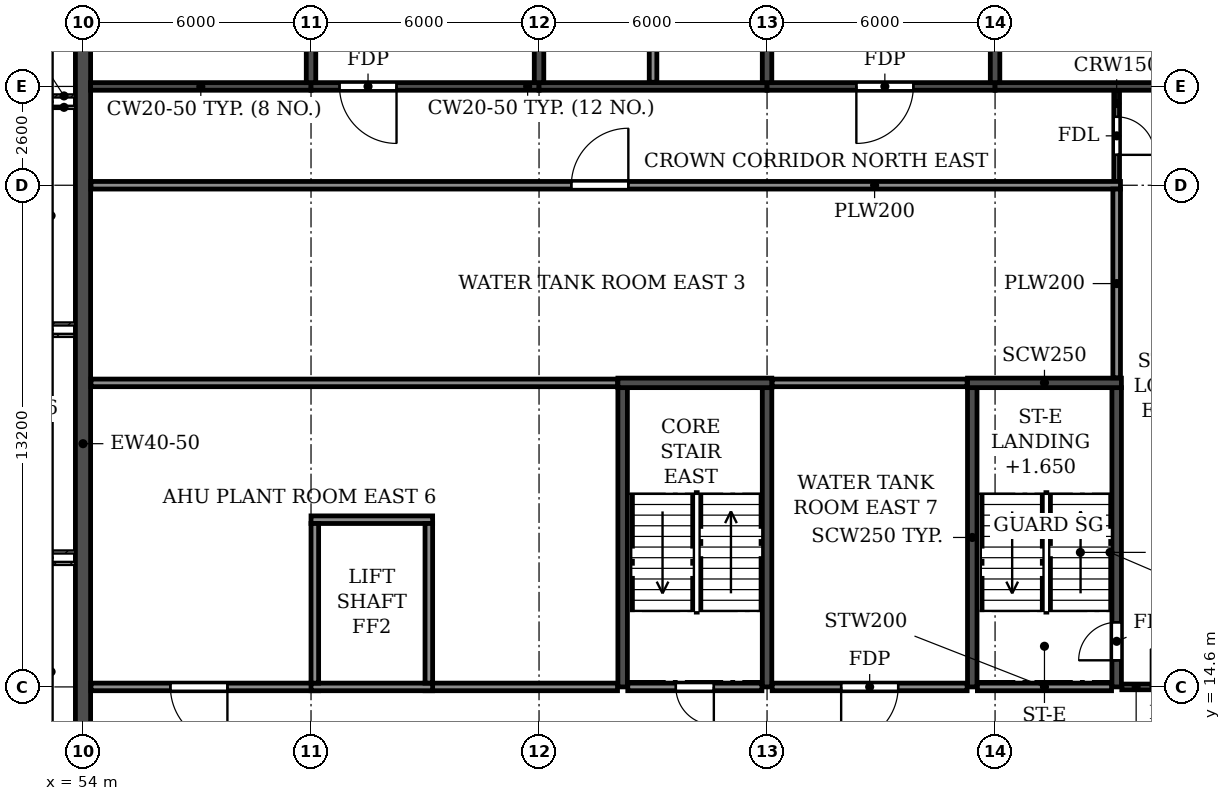
"""IFC4 building model, lengths in metres.
Left out: names, types, materials, properties, quantities, classifications, styles, units other than length and angle.
Written with IfcOpenShell. Run it as: python <this file> out.ifc"""

import sys

from ifc_helpers import new_model, si_unit, direction, frame, frame_2d, origin, place, context, subcontext, project, spatial, rectangle, extrude, element, fill, save


model = new_model("IFC4")
c1 = context("Model", 3, precision=1e-05, world=origin(), true_north=direction((0.0, 1.0)))
c2 = subcontext(c1, "Body", "Model", "MODEL_VIEW")
j1 = project(units=[si_unit("LENGTHUNIT", "METRE"), si_unit("PLANEANGLEUNIT", "RADIAN")], contexts=[c1])
p1 = place(None, origin())
s1 = spatial("IfcSite", under=j1, at=p1, CompositionType="ELEMENT")
p2 = place(p1, origin())
s2 = spatial("IfcBuilding", under=s1, at=p2, CompositionType="ELEMENT")
p3 = place(p2, frame((0.0, 0.0, 272.4)))
s3 = spatial("IfcBuildingStorey", under=s2, at=p3, CompositionType="ELEMENT", Elevation=272.4)
for number, where, z_axis, x_axis in (
    (1, (60.0, 30.5, 0.0), (0.0, 0.0, 1.0), (0.0, 1.0, 0.0)),
    (2, (66.0, 30.5, 0.0), (0.0, 0.0, 1.0), (0.0, 1.0, 0.0)),
    (3, (72.0, 30.5, 0.0), (0.0, 0.0, 1.0), (0.0, 1.0, 0.0)),
    (4, (78.0, 30.5, 0.0), (0.0, 0.0, 1.0), (0.0, 1.0, 0.0)),
):
    element("IfcWall", number, at=place(p3, frame(where, z_axis=z_axis, x_axis=x_axis)), inside=s3, PredefinedType="SHEAR", context=c2, shape_type="SweptSolid", body=[
        extrude(rectangle(XDim=10.5, YDim=0.25, at=frame_2d((5.25, 0.0))), origin(), (0.0, 0.0, 1.0), 3.05),
    ])
p4 = place(p3, frame((54.0, 0.2, 0.0), z_axis=(0.0, 0.0, 1.0), x_axis=(0.0, 1.0, 0.0)))
e5 = element("IfcWall", 5, at=p4, inside=s3, PredefinedType="SHEAR", context=c2, shape_type="SweptSolid", body=[
    extrude(rectangle(XDim=40.8, YDim=0.4, at=frame_2d((20.4, 0.0))), origin(), (0.0, 0.0, 1.0), 3.05),
])
p5 = place(p3, frame((54.2, 30.4, 0.0), z_axis=(0.0, 0.0, 1.0), x_axis=(1.0, 0.0, 0.0)))
e6 = element("IfcWall", 6, at=p5, inside=s3, PredefinedType="SHEAR", context=c2, shape_type="SweptSolid", body=[
    extrude(rectangle(XDim=5.8, YDim=0.2, at=frame_2d((2.9, 0.0))), origin(), (0.0, 0.0, 1.0), 2.45),
])
p6 = place(p3, frame((60.0, 30.4, 0.0), z_axis=(0.0, 0.0, 1.0), x_axis=(1.0, 0.0, 0.0)))
e7 = element("IfcWall", 7, at=p6, inside=s3, PredefinedType="SHEAR", context=c2, shape_type="SweptSolid", body=[
    extrude(rectangle(XDim=6.0, YDim=0.2, at=frame_2d((3.0, 0.0))), origin(), (0.0, 0.0, 1.0), 2.45),
])
p7 = place(p6, frame((0.75, 0.0, 0.0)))
e8 = element("IfcOpeningElement", 8, at=p7, cuts=e7, PredefinedType="OPENING", context=c2, shape_type="SweptSolid", body=[
    extrude(rectangle(XDim=1.5, YDim=2.1, at=frame_2d((0.75, 1.05))), frame((0.0, 0.11, 0.0), z_axis=(0.0, -1.0, 0.0), x_axis=(1.0, 0.0, 0.0)), (0.0, 0.0, 1.0), 0.22),
])
p8 = place(p3, frame((66.0, 30.4, 0.0), z_axis=(0.0, 0.0, 1.0), x_axis=(1.0, 0.0, 0.0)))
e9 = element("IfcWall", 9, at=p8, inside=s3, PredefinedType="SHEAR", context=c2, shape_type="SweptSolid", body=[
    extrude(rectangle(XDim=6.0, YDim=0.2, at=frame_2d((3.0, 0.0))), origin(), (0.0, 0.0, 1.0), 2.45),
])
p9 = place(p3, frame((72.0, 30.4, 0.0), z_axis=(0.0, 0.0, 1.0), x_axis=(1.0, 0.0, 0.0)))
e10 = element("IfcWall", 10, at=p9, inside=s3, PredefinedType="SHEAR", context=c2, shape_type="SweptSolid", body=[
    extrude(rectangle(XDim=6.0, YDim=0.2, at=frame_2d((3.0, 0.0))), origin(), (0.0, 0.0, 1.0), 2.45),
])
p10 = place(p9, frame((2.35, 0.0, 0.0)))
e11 = element("IfcOpeningElement", 11, at=p10, cuts=e10, PredefinedType="OPENING", context=c2, shape_type="SweptSolid", body=[
    extrude(rectangle(XDim=1.5, YDim=2.1, at=frame_2d((0.75, 1.05))), frame((0.0, 0.11, 0.0), z_axis=(0.0, -1.0, 0.0), x_axis=(1.0, 0.0, 0.0)), (0.0, 0.0, 1.0), 0.22),
])
p11 = place(p3, frame((78.0, 30.4, 0.0), z_axis=(0.0, 0.0, 1.0), x_axis=(1.0, 0.0, 0.0)))
e12 = element("IfcWall", 12, at=p11, inside=s3, PredefinedType="SHEAR", context=c2, shape_type="SweptSolid", body=[
    extrude(rectangle(XDim=5.8, YDim=0.2, at=frame_2d((2.9, 0.0))), origin(), (0.0, 0.0, 1.0), 2.45),
])
p12 = place(p3, frame((77.4, 14.6, 0.0), z_axis=(0.0, 0.0, 1.0), x_axis=(0.0, 1.0, 0.0)))
e13 = element("IfcWall", 13, at=p12, inside=s3, PredefinedType="SOLIDWALL", context=c2, shape_type="SweptSolid", body=[
    extrude(rectangle(XDim=7.875, YDim=0.25, at=frame_2d((3.938, 0.0))), origin(), (0.0, 0.0, 1.0), 3.05),
])
p13 = place(p3, frame((81.2, 14.6, 0.0), z_axis=(0.0, 0.0, 1.0), x_axis=(0.0, 1.0, 0.0)))
e14 = element("IfcWall", 14, at=p13, inside=s3, PredefinedType="SOLIDWALL", context=c2, shape_type="SweptSolid", body=[
    extrude(rectangle(XDim=7.875, YDim=0.25, at=frame_2d((3.938, 0.0))), origin(), (0.0, 0.0, 1.0), 3.05),
])
p14 = place(p13, frame((0.7, 0.0, 0.0)))
e15 = element("IfcOpeningElement", 15, at=p14, cuts=e14, PredefinedType="OPENING", context=c2, shape_type="SweptSolid", body=[
    extrude(rectangle(XDim=1.0, YDim=2.1, at=frame_2d((0.5, 1.05))), frame((0.0, 0.135, 0.0), z_axis=(0.0, -1.0, 0.0), x_axis=(1.0, 0.0, 0.0)), (0.0, 0.0, 1.0), 0.27),
])
p15 = place(p3, frame((77.275, 22.6, 0.0), z_axis=(0.0, 0.0, 1.0), x_axis=(1.0, 0.0, 0.0)))
e16 = element("IfcWall", 16, at=p15, inside=s3, PredefinedType="SOLIDWALL", context=c2, shape_type="SweptSolid", body=[
    extrude(rectangle(XDim=4.05, YDim=0.25, at=frame_2d((2.025, 0.0))), origin(), (0.0, 0.0, 1.0), 3.05),
])
for number, where, z_axis, x_axis in (
    (17, (68.2, 14.6, 0.0), (0.0, 0.0, 1.0), (0.0, 1.0, 0.0)),
    (18, (72.0, 14.6, 0.0), (0.0, 0.0, 1.0), (0.0, 1.0, 0.0)),
):
    element("IfcWall", number, at=place(p3, frame(where, z_axis=z_axis, x_axis=x_axis)), inside=s3, PredefinedType="SOLIDWALL", context=c2, shape_type="SweptSolid", body=[
        extrude(rectangle(XDim=7.875, YDim=0.25, at=frame_2d((3.938, 0.0))), origin(), (0.0, 0.0, 1.0), 3.05),
    ])
p16 = place(p3, frame((68.075, 22.6, 0.0), z_axis=(0.0, 0.0, 1.0), x_axis=(1.0, 0.0, 0.0)))
e19 = element("IfcWall", 19, at=p16, inside=s3, PredefinedType="SOLIDWALL", context=c2, shape_type="SweptSolid", body=[
    extrude(rectangle(XDim=4.05, YDim=0.25, at=frame_2d((2.025, 0.0))), origin(), (0.0, 0.0, 1.0), 3.05),
])
p17 = place(p3, frame((81.335, 14.6, 0.0), z_axis=(0.0, 0.0, 1.0), x_axis=(1.0, 0.0, 0.0)))
e20 = element("IfcWall", 20, at=p17, inside=s3, PredefinedType="PARTITIONING", context=c2, shape_type="SweptSolid", body=[
    extrude(rectangle(XDim=2.455, YDim=0.15, at=frame_2d((1.228, 0.0))), origin(), (0.0, 0.0, 1.0), 3.05),
])
p18 = place(p17, frame((0.765, 0.0, 0.0)))
e21 = element("IfcOpeningElement", 21, at=p18, cuts=e20, PredefinedType="OPENING", context=c2, shape_type="SweptSolid", body=[
    extrude(rectangle(XDim=1.0, YDim=2.1, at=frame_2d((0.5, 1.05))), frame((0.0, 0.085, 0.0), z_axis=(0.0, -1.0, 0.0), x_axis=(1.0, 0.0, 0.0)), (0.0, 0.0, 1.0), 0.17),
])
p19 = place(p3, frame((81.2, 27.9, 0.0), z_axis=(0.0, 0.0, 1.0), x_axis=(0.0, 1.0, 0.0)))
e22 = element("IfcWall", 22, at=p19, inside=s3, PredefinedType="PARTITIONING", context=c2, shape_type="SweptSolid", body=[
    extrude(rectangle(XDim=2.39, YDim=0.15, at=frame_2d((1.195, 0.0))), origin(), (0.0, 0.0, 1.0), 3.05),
])
p20 = place(p19, frame((0.7, 0.0, 0.0)))
e23 = element("IfcOpeningElement", 23, at=p20, cuts=e22, PredefinedType="OPENING", context=c2, shape_type="SweptSolid", body=[
    extrude(rectangle(XDim=1.0, YDim=2.1, at=frame_2d((0.5, 1.05))), frame((0.0, 0.085, 0.0), z_axis=(0.0, -1.0, 0.0), x_axis=(1.0, 0.0, 0.0)), (0.0, 0.0, 1.0), 0.17),
])
p21 = place(p3, frame((54.21, 14.6, 0.0), z_axis=(0.0, 0.0, 1.0), x_axis=(1.0, 0.0, 0.0)))
e24 = element("IfcWall", 24, at=p21, inside=s3, PredefinedType="PARTITIONING", context=c2, shape_type="SweptSolid", body=[
    extrude(rectangle(XDim=5.99, YDim=0.2, at=frame_2d((2.995, 0.0))), origin(), (0.0, 0.0, 1.0), 3.05),
])
p22 = place(p21, frame((2.09, 0.0, 0.0)))
e25 = element("IfcOpeningElement", 25, at=p22, cuts=e24, PredefinedType="OPENING", context=c2, shape_type="SweptSolid", body=[
    extrude(rectangle(XDim=1.5, YDim=2.1, at=frame_2d((0.75, 1.05))), frame((0.0, 0.11, 0.0), z_axis=(0.0, -1.0, 0.0), x_axis=(1.0, 0.0, 0.0)), (0.0, 0.0, 1.0), 0.22),
])
p23 = place(p3, frame((63.0, 14.6, 0.0), z_axis=(0.0, 0.0, 1.0), x_axis=(1.0, 0.0, 0.0)))
e26 = element("IfcWall", 26, at=p23, inside=s3, PredefinedType="PARTITIONING", context=c2, shape_type="SweptSolid", body=[
    extrude(rectangle(XDim=5.065, YDim=0.2, at=frame_2d((2.532, 0.0))), origin(), (0.0, 0.0, 1.0), 3.05),
])
p24 = place(p3, frame((72.135, 14.6, 0.0), z_axis=(0.0, 0.0, 1.0), x_axis=(1.0, 0.0, 0.0)))
e27 = element("IfcWall", 27, at=p24, inside=s3, PredefinedType="PARTITIONING", context=c2, shape_type="SweptSolid", body=[
    extrude(rectangle(XDim=5.13, YDim=0.2, at=frame_2d((2.565, 0.0))), origin(), (0.0, 0.0, 1.0), 3.05),
])
p25 = place(p24, frame((1.815, 0.0, 0.0)))
e28 = element("IfcOpeningElement", 28, at=p25, cuts=e27, PredefinedType="OPENING", context=c2, shape_type="SweptSolid", body=[
    extrude(rectangle(XDim=1.5, YDim=2.1, at=frame_2d((0.75, 1.05))), frame((0.0, 0.11, 0.0), z_axis=(0.0, -1.0, 0.0), x_axis=(1.0, 0.0, 0.0)), (0.0, 0.0, 1.0), 0.22),
])
p26 = place(p3, frame((54.21, 22.6, 0.0), z_axis=(0.0, 0.0, 1.0), x_axis=(1.0, 0.0, 0.0)))
e29 = element("IfcWall", 29, at=p26, inside=s3, PredefinedType="PARTITIONING", context=c2, shape_type="SweptSolid", body=[
    extrude(rectangle(XDim=13.855, YDim=0.2, at=frame_2d((6.927, 0.0))), origin(), (0.0, 0.0, 1.0), 3.05),
])
p27 = place(p3, frame((72.135, 22.6, 0.0), z_axis=(0.0, 0.0, 1.0), x_axis=(1.0, 0.0, 0.0)))
e30 = element("IfcWall", 30, at=p27, inside=s3, PredefinedType="PARTITIONING", context=c2, shape_type="SweptSolid", body=[
    extrude(rectangle(XDim=5.13, YDim=0.2, at=frame_2d((2.565, 0.0))), origin(), (0.0, 0.0, 1.0), 3.05),
])
p28 = place(p3, frame((54.21, 27.8, 0.0), z_axis=(0.0, 0.0, 1.0), x_axis=(1.0, 0.0, 0.0)))
e31 = element("IfcWall", 31, at=p28, inside=s3, PredefinedType="PARTITIONING", context=c2, shape_type="SweptSolid", body=[
    extrude(rectangle(XDim=27.09, YDim=0.2, at=frame_2d((13.545, 0.0))), origin(), (0.0, 0.0, 1.0), 3.05),
])
p29 = place(p28, frame((12.64, 0.0, 0.0)))
e32 = element("IfcOpeningElement", 32, at=p29, cuts=e31, PredefinedType="OPENING", context=c2, shape_type="SweptSolid", body=[
    extrude(rectangle(XDim=1.5, YDim=2.1, at=frame_2d((0.75, 1.05))), frame((0.0, 0.11, 0.0), z_axis=(0.0, -1.0, 0.0), x_axis=(1.0, 0.0, 0.0)), (0.0, 0.0, 1.0), 0.22),
])
p30 = place(p3, frame((69.0, 30.51, 0.0), z_axis=(0.0, 0.0, 1.0), x_axis=(0.0, 1.0, 0.0)))
e33 = element("IfcWall", 33, at=p30, inside=s3, PredefinedType="PARTITIONING", context=c2, shape_type="SweptSolid", body=[
    extrude(rectangle(XDim=10.63, YDim=0.2, at=frame_2d((5.315, 0.0))), origin(), (0.0, 0.0, 1.0), 3.05),
])
p31 = place(p3, frame((81.2, 22.735, 0.0), z_axis=(0.0, 0.0, 1.0), x_axis=(0.0, 1.0, 0.0)))
e34 = element("IfcWall", 34, at=p31, inside=s3, PredefinedType="PARTITIONING", context=c2, shape_type="SweptSolid", body=[
    extrude(rectangle(XDim=4.965, YDim=0.2, at=frame_2d((2.482, 0.0))), origin(), (0.0, 0.0, 1.0), 3.05),
])
for number, where, z_axis, x_axis in (
    (35, (60.0, 14.6, 0.0), (0.0, 0.0, 1.0), (1.0, 0.0, 0.0)),
    (36, (60.0, 19.0, 0.0), (0.0, 0.0, 1.0), (1.0, 0.0, 0.0)),
):
    element("IfcWall", number, at=place(p3, frame(where, z_axis=z_axis, x_axis=x_axis)), inside=s3, PredefinedType="PARTITIONING", context=c2, shape_type="SweptSolid", body=[
        extrude(rectangle(XDim=3.2, YDim=0.2, at=frame_2d((1.6, 0.0))), origin(), (0.0, 0.0, 1.0), 3.05),
    ])
for number, where, z_axis, x_axis in (
    (37, (60.1, 14.7, 0.0), (0.0, 0.0, 1.0), (0.0, 1.0, 0.0)),
    (38, (63.1, 14.7, 0.0), (0.0, 0.0, 1.0), (0.0, 1.0, 0.0)),
):
    element("IfcWall", number, at=place(p3, frame(where, z_axis=z_axis, x_axis=x_axis)), inside=s3, PredefinedType="PARTITIONING", context=c2, shape_type="SweptSolid", body=[
        extrude(rectangle(XDim=4.2, YDim=0.2, at=frame_2d((2.1, 0.0))), origin(), (0.0, 0.0, 1.0), 3.05),
    ])
p32 = place(p3, frame((68.335, 14.6, 0.0), z_axis=(0.0, 0.0, 1.0), x_axis=(1.0, 0.0, 0.0)))
e39 = element("IfcWall", 39, at=p32, inside=s3, PredefinedType="PARTITIONING", context=c2, shape_type="SweptSolid", body=[
    extrude(rectangle(XDim=3.53, YDim=0.2, at=frame_2d((1.765, 0.0))), origin(), (0.0, 0.0, 1.0), 3.05),
])
p33 = place(p32, frame((1.265, 0.0, 0.0)))
e40 = element("IfcOpeningElement", 40, at=p33, cuts=e39, PredefinedType="OPENING", context=c2, shape_type="SweptSolid", body=[
    extrude(rectangle(XDim=1.0, YDim=2.1, at=frame_2d((0.5, 1.05))), frame((0.0, 0.11, 0.0), z_axis=(0.0, -1.0, 0.0), x_axis=(1.0, 0.0, 0.0)), (0.0, 0.0, 1.0), 0.22),
])
p34 = place(p3, frame((77.535, 14.6, 0.0), z_axis=(0.0, 0.0, 1.0), x_axis=(1.0, 0.0, 0.0)))
e41 = element("IfcWall", 41, at=p34, inside=s3, PredefinedType="PARTITIONING", context=c2, shape_type="SweptSolid", body=[
    extrude(rectangle(XDim=3.53, YDim=0.2, at=frame_2d((1.765, 0.0))), origin(), (0.0, 0.0, 1.0), 3.05),
])
p35 = place(p7, frame((1.5, 0.0, 0.0), z_axis=(0.0, 0.0, 1.0), x_axis=(-1.0, 0.0, 0.0)))
e42 = element("IfcDoor", 42, at=p35, inside=s3, OperationType="DOUBLE_DOOR_SINGLE_SWING", PredefinedType="DOOR", context=c2, shape_type="SweptSolid", body=[
    extrude(rectangle(XDim=1.5, YDim=2.1, at=frame_2d((0.75, 1.05))), frame((0.0, 0.025, 0.0), z_axis=(0.0, -1.0, 0.0), x_axis=(1.0, 0.0, 0.0)), (0.0, 0.0, 1.0), 0.05),
])
fill(e8, e42)
p36 = place(p29, origin())
e43 = element("IfcDoor", 43, at=p36, inside=s3, OperationType="DOUBLE_DOOR_SINGLE_SWING", PredefinedType="DOOR", context=c2, shape_type="SweptSolid", body=[
    extrude(rectangle(XDim=1.5, YDim=2.1, at=frame_2d((0.75, 1.05))), frame((0.0, 0.025, 0.0), z_axis=(0.0, -1.0, 0.0), x_axis=(1.0, 0.0, 0.0)), (0.0, 0.0, 1.0), 0.05),
])
fill(e32, e43)
p37 = place(p10, frame((1.5, 0.0, 0.0), z_axis=(0.0, 0.0, 1.0), x_axis=(-1.0, 0.0, 0.0)))
e44 = element("IfcDoor", 44, at=p37, inside=s3, OperationType="DOUBLE_DOOR_SINGLE_SWING", PredefinedType="DOOR", context=c2, shape_type="SweptSolid", body=[
    extrude(rectangle(XDim=1.5, YDim=2.1, at=frame_2d((0.75, 1.05))), frame((0.0, 0.025, 0.0), z_axis=(0.0, -1.0, 0.0), x_axis=(1.0, 0.0, 0.0)), (0.0, 0.0, 1.0), 0.05),
])
fill(e11, e44)
p38 = place(p22, frame((1.5, 0.0, 0.0), z_axis=(0.0, 0.0, 1.0), x_axis=(-1.0, 0.0, 0.0)))
e45 = element("IfcDoor", 45, at=p38, inside=s3, OperationType="DOUBLE_DOOR_SINGLE_SWING", PredefinedType="DOOR", context=c2, shape_type="SweptSolid", body=[
    extrude(rectangle(XDim=1.5, YDim=2.1, at=frame_2d((0.75, 1.05))), frame((0.0, 0.025, 0.0), z_axis=(0.0, -1.0, 0.0), x_axis=(1.0, 0.0, 0.0)), (0.0, 0.0, 1.0), 0.05),
])
fill(e25, e45)
p39 = place(p25, frame((1.5, 0.0, 0.0), z_axis=(0.0, 0.0, 1.0), x_axis=(-1.0, 0.0, 0.0)))
e46 = element("IfcDoor", 46, at=p39, inside=s3, OperationType="DOUBLE_DOOR_SINGLE_SWING", PredefinedType="DOOR", context=c2, shape_type="SweptSolid", body=[
    extrude(rectangle(XDim=1.5, YDim=2.1, at=frame_2d((0.75, 1.05))), frame((0.0, 0.025, 0.0), z_axis=(0.0, -1.0, 0.0), x_axis=(1.0, 0.0, 0.0)), (0.0, 0.0, 1.0), 0.05),
])
fill(e28, e46)
p40 = place(p14, origin())
e47 = element("IfcDoor", 47, at=p40, inside=s3, OperationType="SINGLE_SWING_LEFT", PredefinedType="DOOR", context=c2, shape_type="SweptSolid", body=[
    extrude(rectangle(XDim=1.0, YDim=2.1, at=frame_2d((0.5, 1.05))), frame((0.0, 0.025, 0.0), z_axis=(0.0, -1.0, 0.0), x_axis=(1.0, 0.0, 0.0)), (0.0, 0.0, 1.0), 0.05),
])
fill(e15, e47)
p41 = place(p20, frame((1.0, 0.0, 0.0), z_axis=(0.0, 0.0, 1.0), x_axis=(-1.0, 0.0, 0.0)))
e48 = element("IfcDoor", 48, at=p41, inside=s3, OperationType="SINGLE_SWING_RIGHT", PredefinedType="DOOR", context=c2, shape_type="SweptSolid", body=[
    extrude(rectangle(XDim=1.0, YDim=2.1, at=frame_2d((0.5, 1.05))), frame((0.0, 0.025, 0.0), z_axis=(0.0, -1.0, 0.0), x_axis=(1.0, 0.0, 0.0)), (0.0, 0.0, 1.0), 0.05),
])
fill(e23, e48)
p42 = place(p18, origin())
e49 = element("IfcDoor", 49, at=p42, inside=s3, OperationType="SINGLE_SWING_LEFT", PredefinedType="DOOR", context=c2, shape_type="SweptSolid", body=[
    extrude(rectangle(XDim=1.0, YDim=2.1, at=frame_2d((0.5, 1.05))), frame((0.0, 0.025, 0.0), z_axis=(0.0, -1.0, 0.0), x_axis=(1.0, 0.0, 0.0)), (0.0, 0.0, 1.0), 0.05),
])
fill(e21, e49)
p43 = place(p33, frame((1.0, 0.0, 0.0), z_axis=(0.0, 0.0, 1.0), x_axis=(-1.0, 0.0, 0.0)))
e50 = element("IfcDoor", 50, at=p43, inside=s3, OperationType="SINGLE_SWING_LEFT", PredefinedType="DOOR", context=c2, shape_type="SweptSolid", body=[
    extrude(rectangle(XDim=1.0, YDim=2.1, at=frame_2d((0.5, 1.05))), frame((0.0, 0.025, 0.0), z_axis=(0.0, -1.0, 0.0), x_axis=(1.0, 0.0, 0.0)), (0.0, 0.0, 1.0), 0.05),
])
fill(e40, e50)
save(model, sys.argv[1])
